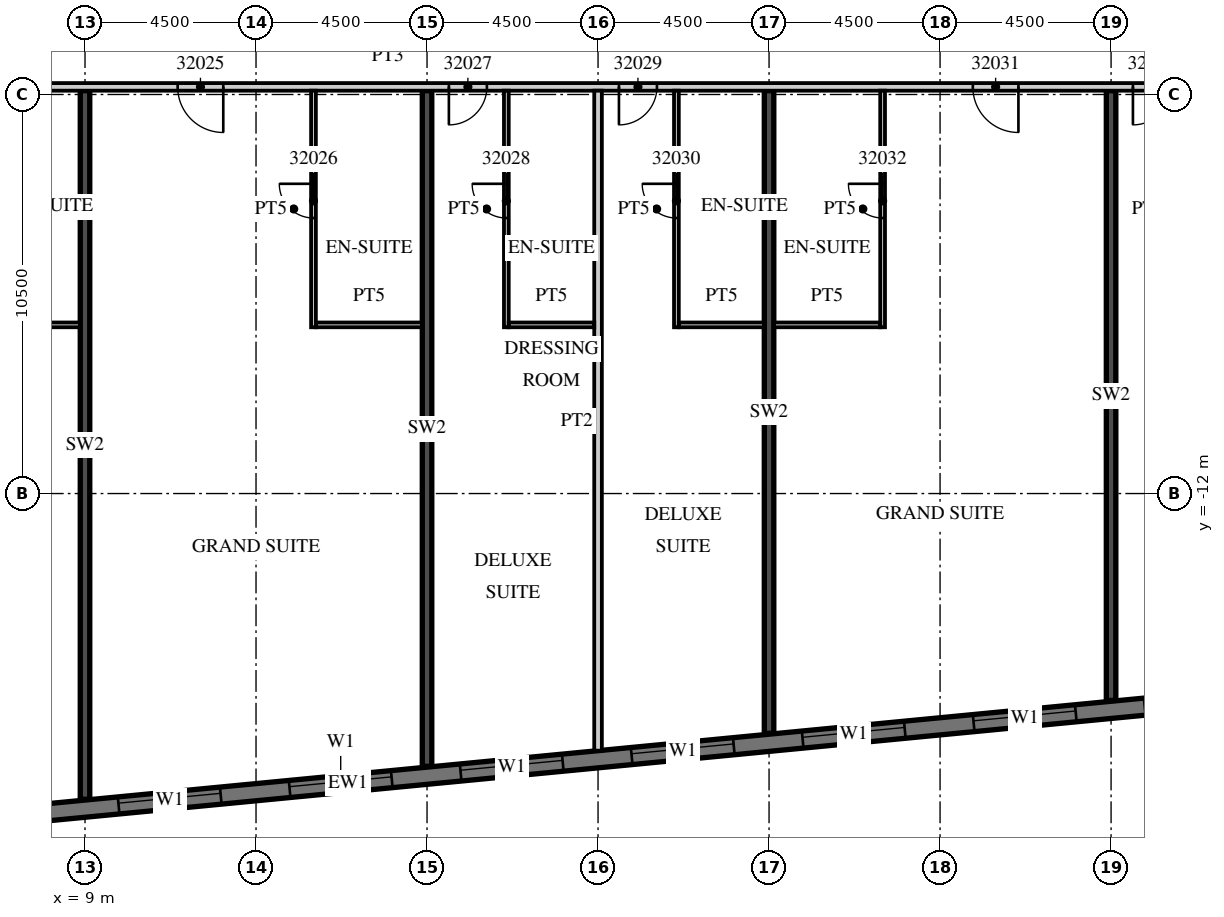
"""IFC4 building model, lengths in metres.
Left out: names, types, materials, properties, quantities, classifications, styles, units other than length and angle.
Written with IfcOpenShell. Run it as: python <this file> out.ifc"""

import sys

from ifc_helpers import new_model, si_unit, direction, frame, frame_2d, origin, place, context, subcontext, project, spatial, rectangle, extrude, element, fill, save


model = new_model("IFC4")
c1 = context("Model", 3, precision=1e-05, world=origin(), true_north=direction((0.0, 1.0)))
c2 = subcontext(c1, "Body", "Model", "MODEL_VIEW")
j1 = project(units=[si_unit("LENGTHUNIT", "METRE"), si_unit("PLANEANGLEUNIT", "RADIAN")], contexts=[c1])
p1 = place(None, origin())
s1 = spatial("IfcSite", under=j1, at=p1, CompositionType="ELEMENT")
p2 = place(p1, origin())
s2 = spatial("IfcBuilding", under=s1, at=p2, CompositionType="ELEMENT")
p3 = place(p2, frame((0.0, 0.0, 140.5)))
s3 = spatial("IfcBuildingStorey", under=s2, at=p3, CompositionType="ELEMENT", Elevation=140.5)
p4 = place(p3, frame((9.0, -20.044, 0.0), z_axis=(0.0, 0.0, 1.0), x_axis=(0.0, 1.0, 0.0)))
e1 = element("IfcWall", 1, at=p4, inside=s3, PredefinedType="SHEAR", context=c2, shape_type="SweptSolid", body=[
    extrude(rectangle(XDim=18.644, YDim=0.25, at=frame_2d((9.322, 0.0))), origin(), (0.0, 0.0, 1.0), 3.3),
])
p5 = place(p3, frame((18.0, -19.177, 0.0), z_axis=(0.0, 0.0, 1.0), x_axis=(0.0, 1.0, 0.0)))
e2 = element("IfcWall", 2, at=p5, inside=s3, PredefinedType="SHEAR", context=c2, shape_type="SweptSolid", body=[
    extrude(rectangle(XDim=17.777, YDim=0.25, at=frame_2d((8.889, 0.0))), origin(), (0.0, 0.0, 1.0), 3.3),
])
p6 = place(p3, frame((27.0, -18.311, 0.0), z_axis=(0.0, 0.0, 1.0), x_axis=(0.0, 1.0, 0.0)))
e3 = element("IfcWall", 3, at=p6, inside=s3, PredefinedType="SHEAR", context=c2, shape_type="SweptSolid", body=[
    extrude(rectangle(XDim=16.911, YDim=0.25, at=frame_2d((8.455, 0.0))), origin(), (0.0, 0.0, 1.0), 3.3),
])
p7 = place(p3, frame((36.0, -17.444, 0.0), z_axis=(0.0, 0.0, 1.0), x_axis=(0.0, 1.0, 0.0)))
e4 = element("IfcWall", 4, at=p7, inside=s3, PredefinedType="SHEAR", context=c2, shape_type="SweptSolid", body=[
    extrude(rectangle(XDim=16.044, YDim=0.25, at=frame_2d((8.022, 0.0))), origin(), (0.0, 0.0, 1.0), 3.3),
])
p8 = place(p3, frame((-13.521, -22.46, 0.0), z_axis=(0.0, 0.0, 1.0), x_axis=(0.995396096335, 0.095846812164, 0.0)))
e5 = element("IfcWall", 5, at=p8, inside=s3, PredefinedType="SOLIDWALL", context=c2, shape_type="SweptSolid", body=[
    extrude(rectangle(XDim=59.151, YDim=0.45, at=frame_2d((29.575, 0.0))), origin(), (0.0, 0.0, 1.0), 3.02),
])
p9 = place(p8, frame((0.91, 0.0, 0.45)))
e6 = element("IfcOpeningElement", 6, at=p9, cuts=e5, PredefinedType="OPENING", context=c2, shape_type="SweptSolid", body=[
    extrude(rectangle(XDim=2.7, YDim=2.25, at=frame_2d((1.35, 1.125))), frame((0.0, 0.235, 0.0), z_axis=(0.0, -1.0, 0.0), x_axis=(1.0, 0.0, 0.0)), (0.0, 0.0, 1.0), 0.47),
])
p10 = place(p8, frame((5.431, 0.0, 0.45)))
e7 = element("IfcOpeningElement", 7, at=p10, cuts=e5, PredefinedType="OPENING", context=c2, shape_type="SweptSolid", body=[
    extrude(rectangle(XDim=2.7, YDim=2.25, at=frame_2d((1.35, 1.125))), frame((0.0, 0.235, 0.0), z_axis=(0.0, -1.0, 0.0), x_axis=(1.0, 0.0, 0.0)), (0.0, 0.0, 1.0), 0.47),
])
p11 = place(p8, frame((9.952, 0.0, 0.45)))
e8 = element("IfcOpeningElement", 8, at=p11, cuts=e5, PredefinedType="OPENING", context=c2, shape_type="SweptSolid", body=[
    extrude(rectangle(XDim=2.7, YDim=2.25, at=frame_2d((1.35, 1.125))), frame((0.0, 0.235, 0.0), z_axis=(0.0, -1.0, 0.0), x_axis=(1.0, 0.0, 0.0)), (0.0, 0.0, 1.0), 0.47),
])
p12 = place(p8, frame((14.473, 0.0, 0.45)))
e9 = element("IfcOpeningElement", 9, at=p12, cuts=e5, PredefinedType="OPENING", context=c2, shape_type="SweptSolid", body=[
    extrude(rectangle(XDim=2.7, YDim=2.25, at=frame_2d((1.35, 1.125))), frame((0.0, 0.235, 0.0), z_axis=(0.0, -1.0, 0.0), x_axis=(1.0, 0.0, 0.0)), (0.0, 0.0, 1.0), 0.47),
])
p13 = place(p8, frame((18.994, 0.0, 0.45)))
e10 = element("IfcOpeningElement", 10, at=p13, cuts=e5, PredefinedType="OPENING", context=c2, shape_type="SweptSolid", body=[
    extrude(rectangle(XDim=2.7, YDim=2.25, at=frame_2d((1.35, 1.125))), frame((0.0, 0.235, 0.0), z_axis=(0.0, -1.0, 0.0), x_axis=(1.0, 0.0, 0.0)), (0.0, 0.0, 1.0), 0.47),
])
p14 = place(p8, frame((23.514, 0.0, 0.45)))
e11 = element("IfcOpeningElement", 11, at=p14, cuts=e5, PredefinedType="OPENING", context=c2, shape_type="SweptSolid", body=[
    extrude(rectangle(XDim=2.7, YDim=2.25, at=frame_2d((1.35, 1.125))), frame((0.0, 0.235, 0.0), z_axis=(0.0, -1.0, 0.0), x_axis=(1.0, 0.0, 0.0)), (0.0, 0.0, 1.0), 0.47),
])
p15 = place(p8, frame((28.035, 0.0, 0.45)))
e12 = element("IfcOpeningElement", 12, at=p15, cuts=e5, PredefinedType="OPENING", context=c2, shape_type="SweptSolid", body=[
    extrude(rectangle(XDim=2.7, YDim=2.25, at=frame_2d((1.35, 1.125))), frame((0.0, 0.235, 0.0), z_axis=(0.0, -1.0, 0.0), x_axis=(1.0, 0.0, 0.0)), (0.0, 0.0, 1.0), 0.47),
])
p16 = place(p8, frame((32.556, 0.0, 0.45)))
e13 = element("IfcOpeningElement", 13, at=p16, cuts=e5, PredefinedType="OPENING", context=c2, shape_type="SweptSolid", body=[
    extrude(rectangle(XDim=2.7, YDim=2.25, at=frame_2d((1.35, 1.125))), frame((0.0, 0.235, 0.0), z_axis=(0.0, -1.0, 0.0), x_axis=(1.0, 0.0, 0.0)), (0.0, 0.0, 1.0), 0.47),
])
p17 = place(p8, frame((37.077, 0.0, 0.45)))
e14 = element("IfcOpeningElement", 14, at=p17, cuts=e5, PredefinedType="OPENING", context=c2, shape_type="SweptSolid", body=[
    extrude(rectangle(XDim=2.7, YDim=2.25, at=frame_2d((1.35, 1.125))), frame((0.0, 0.235, 0.0), z_axis=(0.0, -1.0, 0.0), x_axis=(1.0, 0.0, 0.0)), (0.0, 0.0, 1.0), 0.47),
])
p18 = place(p8, frame((41.598, 0.0, 0.45)))
e15 = element("IfcOpeningElement", 15, at=p18, cuts=e5, PredefinedType="OPENING", context=c2, shape_type="SweptSolid", body=[
    extrude(rectangle(XDim=2.7, YDim=2.25, at=frame_2d((1.35, 1.125))), frame((0.0, 0.235, 0.0), z_axis=(0.0, -1.0, 0.0), x_axis=(1.0, 0.0, 0.0)), (0.0, 0.0, 1.0), 0.47),
])
p19 = place(p8, frame((46.118, 0.0, 0.45)))
e16 = element("IfcOpeningElement", 16, at=p19, cuts=e5, PredefinedType="OPENING", context=c2, shape_type="SweptSolid", body=[
    extrude(rectangle(XDim=2.7, YDim=2.25, at=frame_2d((1.35, 1.125))), frame((0.0, 0.235, 0.0), z_axis=(0.0, -1.0, 0.0), x_axis=(1.0, 0.0, 0.0)), (0.0, 0.0, 1.0), 0.47),
])
p20 = place(p8, frame((50.639, 0.0, 0.45)))
e17 = element("IfcOpeningElement", 17, at=p20, cuts=e5, PredefinedType="OPENING", context=c2, shape_type="SweptSolid", body=[
    extrude(rectangle(XDim=2.7, YDim=2.25, at=frame_2d((1.35, 1.125))), frame((0.0, 0.235, 0.0), z_axis=(0.0, -1.0, 0.0), x_axis=(1.0, 0.0, 0.0)), (0.0, 0.0, 1.0), 0.47),
])
p21 = place(p8, frame((55.15, 0.0, 0.45)))
e18 = element("IfcOpeningElement", 18, at=p21, cuts=e5, PredefinedType="OPENING", context=c2, shape_type="SweptSolid", body=[
    extrude(rectangle(XDim=2.7, YDim=2.25, at=frame_2d((1.35, 1.125))), frame((0.0, 0.235, 0.0), z_axis=(0.0, -1.0, 0.0), x_axis=(1.0, 0.0, 0.0)), (0.0, 0.0, 1.0), 0.47),
])
p22 = place(p3, frame((-13.5, -1.3, 0.0), z_axis=(0.0, 0.0, 1.0), x_axis=(1.0, 0.0, 0.0)))
e19 = element("IfcWall", 19, at=p22, inside=s3, PredefinedType="PARTITIONING", context=c2, shape_type="SweptSolid", body=[
    extrude(rectangle(XDim=60.932, YDim=0.2, at=frame_2d((30.466, 0.0))), origin(), (0.0, 0.0, 1.0), 3.02),
])
p23 = place(p22, frame((2.925, 0.0, 0.0)))
e20 = element("IfcOpeningElement", 20, at=p23, cuts=e19, PredefinedType="OPENING", context=c2, shape_type="SweptSolid", body=[
    extrude(rectangle(XDim=1.0, YDim=2.1, at=frame_2d((0.5, 1.05))), frame((0.0, 0.11, 0.0), z_axis=(0.0, -1.0, 0.0), x_axis=(1.0, 0.0, 0.0)), (0.0, 0.0, 1.0), 0.22),
])
p24 = place(p22, frame((7.45, 0.0, 0.0)))
e21 = element("IfcOpeningElement", 21, at=p24, cuts=e19, PredefinedType="OPENING", context=c2, shape_type="SweptSolid", body=[
    extrude(rectangle(XDim=1.0, YDim=2.1, at=frame_2d((0.5, 1.05))), frame((0.0, 0.11, 0.0), z_axis=(0.0, -1.0, 0.0), x_axis=(1.0, 0.0, 0.0)), (0.0, 0.0, 1.0), 0.22),
])
p25 = place(p22, frame((9.55, 0.0, 0.0)))
e22 = element("IfcOpeningElement", 22, at=p25, cuts=e19, PredefinedType="OPENING", context=c2, shape_type="SweptSolid", body=[
    extrude(rectangle(XDim=1.0, YDim=2.1, at=frame_2d((0.5, 1.05))), frame((0.0, 0.11, 0.0), z_axis=(0.0, -1.0, 0.0), x_axis=(1.0, 0.0, 0.0)), (0.0, 0.0, 1.0), 0.22),
])
p26 = place(p22, frame((15.938, 0.0, 0.0)))
e23 = element("IfcOpeningElement", 23, at=p26, cuts=e19, PredefinedType="OPENING", context=c2, shape_type="SweptSolid", body=[
    extrude(rectangle(XDim=1.2, YDim=2.1, at=frame_2d((0.6, 1.05))), frame((0.0, 0.11, 0.0), z_axis=(0.0, -1.0, 0.0), x_axis=(1.0, 0.0, 0.0)), (0.0, 0.0, 1.0), 0.22),
])
p27 = place(p22, frame((24.938, 0.0, 0.0)))
e24 = element("IfcOpeningElement", 24, at=p27, cuts=e19, PredefinedType="OPENING", context=c2, shape_type="SweptSolid", body=[
    extrude(rectangle(XDim=1.2, YDim=2.1, at=frame_2d((0.6, 1.05))), frame((0.0, 0.11, 0.0), z_axis=(0.0, -1.0, 0.0), x_axis=(1.0, 0.0, 0.0)), (0.0, 0.0, 1.0), 0.22),
])
p28 = place(p22, frame((32.075, 0.0, 0.0)))
e25 = element("IfcOpeningElement", 25, at=p28, cuts=e19, PredefinedType="OPENING", context=c2, shape_type="SweptSolid", body=[
    extrude(rectangle(XDim=1.0, YDim=2.1, at=frame_2d((0.5, 1.05))), frame((0.0, 0.11, 0.0), z_axis=(0.0, -1.0, 0.0), x_axis=(1.0, 0.0, 0.0)), (0.0, 0.0, 1.0), 0.22),
])
p29 = place(p22, frame((36.55, 0.0, 0.0)))
e26 = element("IfcOpeningElement", 26, at=p29, cuts=e19, PredefinedType="OPENING", context=c2, shape_type="SweptSolid", body=[
    extrude(rectangle(XDim=1.0, YDim=2.1, at=frame_2d((0.5, 1.05))), frame((0.0, 0.11, 0.0), z_axis=(0.0, -1.0, 0.0), x_axis=(1.0, 0.0, 0.0)), (0.0, 0.0, 1.0), 0.22),
])
p30 = place(p22, frame((45.862, 0.0, 0.0)))
e27 = element("IfcOpeningElement", 27, at=p30, cuts=e19, PredefinedType="OPENING", context=c2, shape_type="SweptSolid", body=[
    extrude(rectangle(XDim=1.2, YDim=2.1, at=frame_2d((0.6, 1.05))), frame((0.0, 0.11, 0.0), z_axis=(0.0, -1.0, 0.0), x_axis=(1.0, 0.0, 0.0)), (0.0, 0.0, 1.0), 0.22),
])
p31 = place(p22, frame((50.075, 0.0, 0.0)))
e28 = element("IfcOpeningElement", 28, at=p31, cuts=e19, PredefinedType="OPENING", context=c2, shape_type="SweptSolid", body=[
    extrude(rectangle(XDim=1.0, YDim=2.1, at=frame_2d((0.5, 1.05))), frame((0.0, 0.11, 0.0), z_axis=(0.0, -1.0, 0.0), x_axis=(1.0, 0.0, 0.0)), (0.0, 0.0, 1.0), 0.22),
])
p32 = place(p22, frame((56.95, 0.0, 0.0)))
e29 = element("IfcOpeningElement", 29, at=p32, cuts=e19, PredefinedType="OPENING", context=c2, shape_type="SweptSolid", body=[
    extrude(rectangle(XDim=1.0, YDim=2.1, at=frame_2d((0.5, 1.05))), frame((0.0, 0.11, 0.0), z_axis=(0.0, -1.0, 0.0), x_axis=(1.0, 0.0, 0.0)), (0.0, 0.0, 1.0), 0.22),
])
p33 = place(p22, frame((59.882, 0.0, 0.0)))
e30 = element("IfcOpeningElement", 30, at=p33, cuts=e19, PredefinedType="OPENING", context=c2, shape_type="SweptSolid", body=[
    extrude(rectangle(XDim=0.9, YDim=2.1, at=frame_2d((0.45, 1.05))), frame((0.0, 0.11, 0.0), z_axis=(0.0, -1.0, 0.0), x_axis=(1.0, 0.0, 0.0)), (0.0, 0.0, 1.0), 0.22),
])
p34 = place(p3, frame((6.075, -7.562, 0.0), z_axis=(0.0, 0.0, 1.0), x_axis=(1.0, 0.0, 0.0)))
e31 = element("IfcWall", 31, at=p34, inside=s3, PredefinedType="PARTITIONING", context=c2, shape_type="SweptSolid", body=[
    extrude(rectangle(XDim=2.8, YDim=0.125, at=frame_2d((1.4, 0.0))), origin(), (0.0, 0.0, 1.0), 3.02),
])
p35 = place(p3, frame((15.012, -7.625, 0.0), z_axis=(0.0, 0.0, 1.0), x_axis=(0.0, 1.0, 0.0)))
e32 = element("IfcWall", 32, at=p35, inside=s3, PredefinedType="PARTITIONING", context=c2, shape_type="SweptSolid", body=[
    extrude(rectangle(XDim=6.225, YDim=0.125, at=frame_2d((3.113, 0.0))), origin(), (0.0, 0.0, 1.0), 3.02),
])
p36 = place(p35, frame((2.875, 0.0, 0.0)))
e33 = element("IfcOpeningElement", 33, at=p36, cuts=e32, PredefinedType="OPENING", context=c2, shape_type="SweptSolid", body=[
    extrude(rectangle(XDim=0.9, YDim=2.1, at=frame_2d((0.45, 1.05))), frame((0.0, 0.073, 0.0), z_axis=(0.0, -1.0, 0.0), x_axis=(1.0, 0.0, 0.0)), (0.0, 0.0, 1.0), 0.145),
])
p37 = place(p3, frame((15.075, -7.562, 0.0), z_axis=(0.0, 0.0, 1.0), x_axis=(1.0, 0.0, 0.0)))
e34 = element("IfcWall", 34, at=p37, inside=s3, PredefinedType="PARTITIONING", context=c2, shape_type="SweptSolid", body=[
    extrude(rectangle(XDim=2.8, YDim=0.125, at=frame_2d((1.4, 0.0))), origin(), (0.0, 0.0, 1.0), 3.02),
])
p38 = place(p3, frame((22.5, -18.766, 0.0), z_axis=(0.0, 0.0, 1.0), x_axis=(0.0, 1.0, 0.0)))
e35 = element("IfcWall", 35, at=p38, inside=s3, PredefinedType="PARTITIONING", context=c2, shape_type="SweptSolid", body=[
    extrude(rectangle(XDim=17.366, YDim=0.2, at=frame_2d((8.683, 0.0))), origin(), (0.0, 0.0, 1.0), 3.02),
])
p39 = place(p3, frame((20.087, -7.625, 0.0), z_axis=(0.0, 0.0, 1.0), x_axis=(0.0, 1.0, 0.0)))
e36 = element("IfcWall", 36, at=p39, inside=s3, PredefinedType="PARTITIONING", context=c2, shape_type="SweptSolid", body=[
    extrude(rectangle(XDim=6.225, YDim=0.125, at=frame_2d((3.113, 0.0))), origin(), (0.0, 0.0, 1.0), 3.02),
])
p40 = place(p39, frame((2.875, 0.0, 0.0)))
e37 = element("IfcOpeningElement", 37, at=p40, cuts=e36, PredefinedType="OPENING", context=c2, shape_type="SweptSolid", body=[
    extrude(rectangle(XDim=0.9, YDim=2.1, at=frame_2d((0.45, 1.05))), frame((0.0, 0.073, 0.0), z_axis=(0.0, -1.0, 0.0), x_axis=(1.0, 0.0, 0.0)), (0.0, 0.0, 1.0), 0.145),
])
p41 = place(p3, frame((20.15, -7.562, 0.0), z_axis=(0.0, 0.0, 1.0), x_axis=(1.0, 0.0, 0.0)))
e38 = element("IfcWall", 38, at=p41, inside=s3, PredefinedType="PARTITIONING", context=c2, shape_type="SweptSolid", body=[
    extrude(rectangle(XDim=2.25, YDim=0.125, at=frame_2d((1.125, 0.0))), origin(), (0.0, 0.0, 1.0), 3.02),
])
p42 = place(p3, frame((24.562, -7.625, 0.0), z_axis=(0.0, 0.0, 1.0), x_axis=(0.0, 1.0, 0.0)))
e39 = element("IfcWall", 39, at=p42, inside=s3, PredefinedType="PARTITIONING", context=c2, shape_type="SweptSolid", body=[
    extrude(rectangle(XDim=6.225, YDim=0.125, at=frame_2d((3.113, 0.0))), origin(), (0.0, 0.0, 1.0), 3.02),
])
p43 = place(p42, frame((2.875, 0.0, 0.0)))
e40 = element("IfcOpeningElement", 40, at=p43, cuts=e39, PredefinedType="OPENING", context=c2, shape_type="SweptSolid", body=[
    extrude(rectangle(XDim=0.9, YDim=2.1, at=frame_2d((0.45, 1.05))), frame((0.0, 0.073, 0.0), z_axis=(0.0, -1.0, 0.0), x_axis=(1.0, 0.0, 0.0)), (0.0, 0.0, 1.0), 0.145),
])
p44 = place(p3, frame((24.625, -7.562, 0.0), z_axis=(0.0, 0.0, 1.0), x_axis=(1.0, 0.0, 0.0)))
e41 = element("IfcWall", 41, at=p44, inside=s3, PredefinedType="PARTITIONING", context=c2, shape_type="SweptSolid", body=[
    extrude(rectangle(XDim=2.25, YDim=0.125, at=frame_2d((1.125, 0.0))), origin(), (0.0, 0.0, 1.0), 3.02),
])
p45 = place(p3, frame((29.988, -7.625, 0.0), z_axis=(0.0, 0.0, 1.0), x_axis=(0.0, 1.0, 0.0)))
e42 = element("IfcWall", 42, at=p45, inside=s3, PredefinedType="PARTITIONING", context=c2, shape_type="SweptSolid", body=[
    extrude(rectangle(XDim=6.225, YDim=0.125, at=frame_2d((3.113, 0.0))), origin(), (0.0, 0.0, 1.0), 3.02),
])
p46 = place(p45, frame((2.875, 0.0, 0.0)))
e43 = element("IfcOpeningElement", 43, at=p46, cuts=e42, PredefinedType="OPENING", context=c2, shape_type="SweptSolid", body=[
    extrude(rectangle(XDim=0.9, YDim=2.1, at=frame_2d((0.45, 1.05))), frame((0.0, 0.073, 0.0), z_axis=(0.0, -1.0, 0.0), x_axis=(1.0, 0.0, 0.0)), (0.0, 0.0, 1.0), 0.145),
])
p47 = place(p3, frame((27.125, -7.562, 0.0), z_axis=(0.0, 0.0, 1.0), x_axis=(1.0, 0.0, 0.0)))
e44 = element("IfcWall", 44, at=p47, inside=s3, PredefinedType="PARTITIONING", context=c2, shape_type="SweptSolid", body=[
    extrude(rectangle(XDim=2.8, YDim=0.125, at=frame_2d((1.4, 0.0))), origin(), (0.0, 0.0, 1.0), 3.02),
])
p48 = place(p14, origin())
e45 = element("IfcWindow", 45, at=p48, inside=s3, PartitioningType="SINGLE_PANEL", PredefinedType="WINDOW", context=c2, shape_type="SweptSolid", body=[
    extrude(rectangle(XDim=2.7, YDim=2.25, at=frame_2d((1.35, 1.125))), frame((0.0, 0.09, 0.0), z_axis=(0.0, -1.0, 0.0), x_axis=(1.0, 0.0, 0.0)), (0.0, 0.0, 1.0), 0.06),
])
fill(e11, e45)
p49 = place(p15, origin())
e46 = element("IfcWindow", 46, at=p49, inside=s3, PartitioningType="SINGLE_PANEL", PredefinedType="WINDOW", context=c2, shape_type="SweptSolid", body=[
    extrude(rectangle(XDim=2.7, YDim=2.25, at=frame_2d((1.35, 1.125))), frame((0.0, 0.09, 0.0), z_axis=(0.0, -1.0, 0.0), x_axis=(1.0, 0.0, 0.0)), (0.0, 0.0, 1.0), 0.06),
])
fill(e12, e46)
p50 = place(p16, origin())
e47 = element("IfcWindow", 47, at=p50, inside=s3, PartitioningType="SINGLE_PANEL", PredefinedType="WINDOW", context=c2, shape_type="SweptSolid", body=[
    extrude(rectangle(XDim=2.7, YDim=2.25, at=frame_2d((1.35, 1.125))), frame((0.0, 0.09, 0.0), z_axis=(0.0, -1.0, 0.0), x_axis=(1.0, 0.0, 0.0)), (0.0, 0.0, 1.0), 0.06),
])
fill(e13, e47)
p51 = place(p17, origin())
e48 = element("IfcWindow", 48, at=p51, inside=s3, PartitioningType="SINGLE_PANEL", PredefinedType="WINDOW", context=c2, shape_type="SweptSolid", body=[
    extrude(rectangle(XDim=2.7, YDim=2.25, at=frame_2d((1.35, 1.125))), frame((0.0, 0.09, 0.0), z_axis=(0.0, -1.0, 0.0), x_axis=(1.0, 0.0, 0.0)), (0.0, 0.0, 1.0), 0.06),
])
fill(e14, e48)
p52 = place(p18, origin())
e49 = element("IfcWindow", 49, at=p52, inside=s3, PartitioningType="SINGLE_PANEL", PredefinedType="WINDOW", context=c2, shape_type="SweptSolid", body=[
    extrude(rectangle(XDim=2.7, YDim=2.25, at=frame_2d((1.35, 1.125))), frame((0.0, 0.09, 0.0), z_axis=(0.0, -1.0, 0.0), x_axis=(1.0, 0.0, 0.0)), (0.0, 0.0, 1.0), 0.06),
])
fill(e15, e49)
p53 = place(p19, origin())
e50 = element("IfcWindow", 50, at=p53, inside=s3, PartitioningType="SINGLE_PANEL", PredefinedType="WINDOW", context=c2, shape_type="SweptSolid", body=[
    extrude(rectangle(XDim=2.7, YDim=2.25, at=frame_2d((1.35, 1.125))), frame((0.0, 0.09, 0.0), z_axis=(0.0, -1.0, 0.0), x_axis=(1.0, 0.0, 0.0)), (0.0, 0.0, 1.0), 0.06),
])
fill(e16, e50)
p54 = place(p27, origin())
e51 = element("IfcDoor", 51, at=p54, inside=s3, OperationType="SINGLE_SWING_RIGHT", PredefinedType="DOOR", context=c2, shape_type="SweptSolid", body=[
    extrude(rectangle(XDim=1.2, YDim=2.1, at=frame_2d((0.6, 1.05))), frame((0.0, 0.025, 0.0), z_axis=(0.0, -1.0, 0.0), x_axis=(1.0, 0.0, 0.0)), (0.0, 0.0, 1.0), 0.05),
])
fill(e24, e51)
p55 = place(p36, origin())
e52 = element("IfcDoor", 52, at=p55, inside=s3, OperationType="SINGLE_SWING_RIGHT", PredefinedType="DOOR", context=c2, shape_type="SweptSolid", body=[
    extrude(rectangle(XDim=0.9, YDim=2.1, at=frame_2d((0.45, 1.05))), frame((0.0, 0.025, 0.0), z_axis=(0.0, -1.0, 0.0), x_axis=(1.0, 0.0, 0.0)), (0.0, 0.0, 1.0), 0.05),
])
fill(e33, e52)
p56 = place(p28, origin())
e53 = element("IfcDoor", 53, at=p56, inside=s3, OperationType="SINGLE_SWING_LEFT", PredefinedType="DOOR", context=c2, shape_type="SweptSolid", body=[
    extrude(rectangle(XDim=1.0, YDim=2.1, at=frame_2d((0.5, 1.05))), frame((0.0, 0.025, 0.0), z_axis=(0.0, -1.0, 0.0), x_axis=(1.0, 0.0, 0.0)), (0.0, 0.0, 1.0), 0.05),
])
fill(e25, e53)
p57 = place(p40, origin())
e54 = element("IfcDoor", 54, at=p57, inside=s3, OperationType="SINGLE_SWING_RIGHT", PredefinedType="DOOR", context=c2, shape_type="SweptSolid", body=[
    extrude(rectangle(XDim=0.9, YDim=2.1, at=frame_2d((0.45, 1.05))), frame((0.0, 0.025, 0.0), z_axis=(0.0, -1.0, 0.0), x_axis=(1.0, 0.0, 0.0)), (0.0, 0.0, 1.0), 0.05),
])
fill(e37, e54)
p58 = place(p29, origin())
e55 = element("IfcDoor", 55, at=p58, inside=s3, OperationType="SINGLE_SWING_LEFT", PredefinedType="DOOR", context=c2, shape_type="SweptSolid", body=[
    extrude(rectangle(XDim=1.0, YDim=2.1, at=frame_2d((0.5, 1.05))), frame((0.0, 0.025, 0.0), z_axis=(0.0, -1.0, 0.0), x_axis=(1.0, 0.0, 0.0)), (0.0, 0.0, 1.0), 0.05),
])
fill(e26, e55)
p59 = place(p43, origin())
e56 = element("IfcDoor", 56, at=p59, inside=s3, OperationType="SINGLE_SWING_RIGHT", PredefinedType="DOOR", context=c2, shape_type="SweptSolid", body=[
    extrude(rectangle(XDim=0.9, YDim=2.1, at=frame_2d((0.45, 1.05))), frame((0.0, 0.025, 0.0), z_axis=(0.0, -1.0, 0.0), x_axis=(1.0, 0.0, 0.0)), (0.0, 0.0, 1.0), 0.05),
])
fill(e40, e56)
p60 = place(p30, origin())
e57 = element("IfcDoor", 57, at=p60, inside=s3, OperationType="SINGLE_SWING_RIGHT", PredefinedType="DOOR", context=c2, shape_type="SweptSolid", body=[
    extrude(rectangle(XDim=1.2, YDim=2.1, at=frame_2d((0.6, 1.05))), frame((0.0, 0.025, 0.0), z_axis=(0.0, -1.0, 0.0), x_axis=(1.0, 0.0, 0.0)), (0.0, 0.0, 1.0), 0.05),
])
fill(e27, e57)
p61 = place(p46, origin())
e58 = element("IfcDoor", 58, at=p61, inside=s3, OperationType="SINGLE_SWING_RIGHT", PredefinedType="DOOR", context=c2, shape_type="SweptSolid", body=[
    extrude(rectangle(XDim=0.9, YDim=2.1, at=frame_2d((0.45, 1.05))), frame((0.0, 0.025, 0.0), z_axis=(0.0, -1.0, 0.0), x_axis=(1.0, 0.0, 0.0)), (0.0, 0.0, 1.0), 0.05),
])
fill(e43, e58)
p62 = place(p31, origin())
e59 = element("IfcDoor", 59, at=p62, inside=s3, OperationType="SINGLE_SWING_LEFT", PredefinedType="DOOR", context=c2, shape_type="SweptSolid", body=[
    extrude(rectangle(XDim=1.0, YDim=2.1, at=frame_2d((0.5, 1.05))), frame((0.0, 0.025, 0.0), z_axis=(0.0, -1.0, 0.0), x_axis=(1.0, 0.0, 0.0)), (0.0, 0.0, 1.0), 0.05),
])
fill(e28, e59)
save(model, sys.argv[1])
